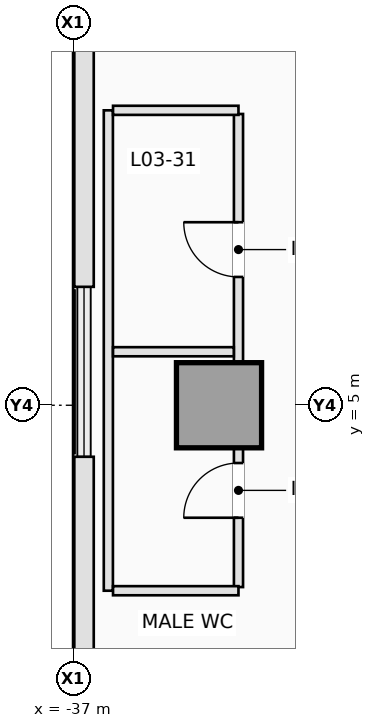
"""IFC4 building model, lengths in metres.
Left out: names, types, materials, properties, quantities, classifications, styles, units other than length and angle.
Written with IfcOpenShell. Run it as: python <this file> out.ifc"""

import sys

from ifc_helpers import new_model, si_unit, direction, frame, frame_2d, origin, origin_2d, place, context, subcontext, project, spatial, rectangle, extrude, element, fill, save


model = new_model("IFC4")
c1 = context("Model", 3, precision=1e-05, world=origin(), true_north=direction((0.0, 1.0)))
c2 = subcontext(c1, "Body", "Model", "MODEL_VIEW")
j1 = project(units=[si_unit("LENGTHUNIT", "METRE"), si_unit("PLANEANGLEUNIT", "RADIAN")], contexts=[c1])
p1 = place(None, origin())
s1 = spatial("IfcSite", under=j1, at=p1, CompositionType="ELEMENT")
p2 = place(p1, origin())
s2 = spatial("IfcBuilding", under=s1, at=p2, CompositionType="ELEMENT")
p3 = place(p2, frame((0.0, 0.0, 14.0)))
s3 = spatial("IfcBuildingStorey", under=s2, at=p3, CompositionType="ELEMENT", Elevation=14.0)
p4 = place(p3, frame((-34.6, 5.0, 0.0), z_axis=(0.0, 0.0, 1.0), x_axis=(1.0, 0.0, 0.0)))
e1 = element("IfcColumn", 1, at=p4, inside=s3, PredefinedType="COLUMN", context=c2, shape_type="SweptSolid", body=[
    extrude(rectangle(XDim=1.4, YDim=1.4, at=origin_2d()), origin(), (0.0, 0.0, 1.0), 4.5),
])
p5 = place(p3, frame((-36.82, -4.153, 0.0), z_axis=(0.0, 0.0, 1.0), x_axis=(0.0, 1.0, 0.0)))
e2 = element("IfcWall", 2, at=p5, inside=s3, PredefinedType="STANDARD", context=c2, shape_type="SweptSolid", body=[
    extrude(rectangle(XDim=8.305, YDim=0.32, at=frame_2d((4.153, 0.0))), origin(), (0.0, 0.0, 1.0), 4.2),
])
p6 = place(p3, frame((-36.82, 6.947, 0.0), z_axis=(0.0, 0.0, 1.0), x_axis=(0.0, 1.0, 0.0)))
e3 = element("IfcWall", 3, at=p6, inside=s3, PredefinedType="STANDARD", context=c2, shape_type="SweptSolid", body=[
    extrude(rectangle(XDim=8.305, YDim=0.32, at=frame_2d((4.153, 0.0))), origin(), (0.0, 0.0, 1.0), 4.2),
])
p7 = place(p3, frame((-36.42, 1.95, 0.0), z_axis=(0.0, 0.0, 1.0), x_axis=(0.0, 1.0, 0.0)))
e4 = element("IfcWall", 4, at=p7, inside=s3, PredefinedType="PARTITIONING", context=c2, shape_type="SweptSolid", body=[
    extrude(rectangle(XDim=7.9, YDim=0.15, at=frame_2d((3.95, 0.0))), origin(), (0.0, 0.0, 1.0), 4.2),
])
p8 = place(p3, frame((-34.28, 2.01, 0.0), z_axis=(0.0, 0.0, 1.0), x_axis=(0.0, 1.0, 0.0)))
e5 = element("IfcWall", 5, at=p8, inside=s3, PredefinedType="PARTITIONING", context=c2, shape_type="SweptSolid", body=[
    extrude(rectangle(XDim=2.288, YDim=0.15, at=frame_2d((1.144, 0.0))), origin(), (0.0, 0.0, 1.0), 4.2),
])
p9 = place(p8, frame((1.14, 0.0, 0.0)))
e6 = element("IfcOpeningElement", 6, at=p9, cuts=e5, PredefinedType="OPENING", context=c2, shape_type="SweptSolid", body=[
    extrude(rectangle(XDim=0.9, YDim=2.12, at=frame_2d((0.45, 1.06))), frame((0.0, 0.085, 0.0), z_axis=(0.0, -1.0, 0.0), x_axis=(1.0, 0.0, 0.0)), (0.0, 0.0, 1.0), 0.17),
])
p10 = place(p3, frame((-34.28, 5.702, 0.0), z_axis=(0.0, 0.0, 1.0), x_axis=(0.0, 1.0, 0.0)))
e7 = element("IfcWall", 7, at=p10, inside=s3, PredefinedType="PARTITIONING", context=c2, shape_type="SweptSolid", body=[
    extrude(rectangle(XDim=4.088, YDim=0.15, at=frame_2d((2.044, 0.0))), origin(), (0.0, 0.0, 1.0), 4.2),
])
p11 = place(p10, frame((1.408, 0.0, 0.0)))
e8 = element("IfcOpeningElement", 8, at=p11, cuts=e7, PredefinedType="OPENING", context=c2, shape_type="SweptSolid", body=[
    extrude(rectangle(XDim=0.9, YDim=2.12, at=frame_2d((0.45, 1.06))), frame((0.0, 0.085, 0.0), z_axis=(0.0, -1.0, 0.0), x_axis=(1.0, 0.0, 0.0)), (0.0, 0.0, 1.0), 0.17),
])
p12 = place(p3, frame((-36.343, 5.88, 0.0), z_axis=(0.0, 0.0, 1.0), x_axis=(1.0, 0.0, 0.0)))
e9 = element("IfcWall", 9, at=p12, inside=s3, PredefinedType="PARTITIONING", context=c2, shape_type="SweptSolid", body=[
    extrude(rectangle(XDim=1.986, YDim=0.15, at=frame_2d((0.993, 0.0))), origin(), (0.0, 0.0, 1.0), 4.2),
])
for number, where, z_axis, x_axis in (
    (10, (-36.343, 1.95, 0.0), (0.0, 0.0, 1.0), (1.0, 0.0, 0.0)),
    (11, (-36.343, 9.85, 0.0), (0.0, 0.0, 1.0), (1.0, 0.0, 0.0)),
):
    element("IfcWall", number, at=place(p3, frame(where, z_axis=z_axis, x_axis=x_axis)), inside=s3, PredefinedType="PARTITIONING", context=c2, shape_type="SweptSolid", body=[
        extrude(rectangle(XDim=2.063, YDim=0.15, at=frame_2d((1.031, 0.0))), origin(), (0.0, 0.0, 1.0), 4.2),
    ])
p13 = place(p9, origin())
e12 = element("IfcDoor", 12, at=p13, inside=s3, OperationType="SINGLE_SWING_LEFT", PredefinedType="DOOR", context=c2, shape_type="SweptSolid", body=[
    extrude(rectangle(XDim=0.9, YDim=2.12, at=frame_2d((0.45, 1.06))), frame((0.0, 0.025, 0.0), z_axis=(0.0, -1.0, 0.0), x_axis=(1.0, 0.0, 0.0)), (0.0, 0.0, 1.0), 0.05),
])
fill(e6, e12)
p14 = place(p11, origin())
e13 = element("IfcDoor", 13, at=p14, inside=s3, OperationType="SINGLE_SWING_RIGHT", PredefinedType="DOOR", context=c2, shape_type="SweptSolid", body=[
    extrude(rectangle(XDim=0.9, YDim=2.12, at=frame_2d((0.45, 1.06))), frame((0.0, 0.025, 0.0), z_axis=(0.0, -1.0, 0.0), x_axis=(1.0, 0.0, 0.0)), (0.0, 0.0, 1.0), 0.05),
])
fill(e8, e13)
save(model, sys.argv[1])
